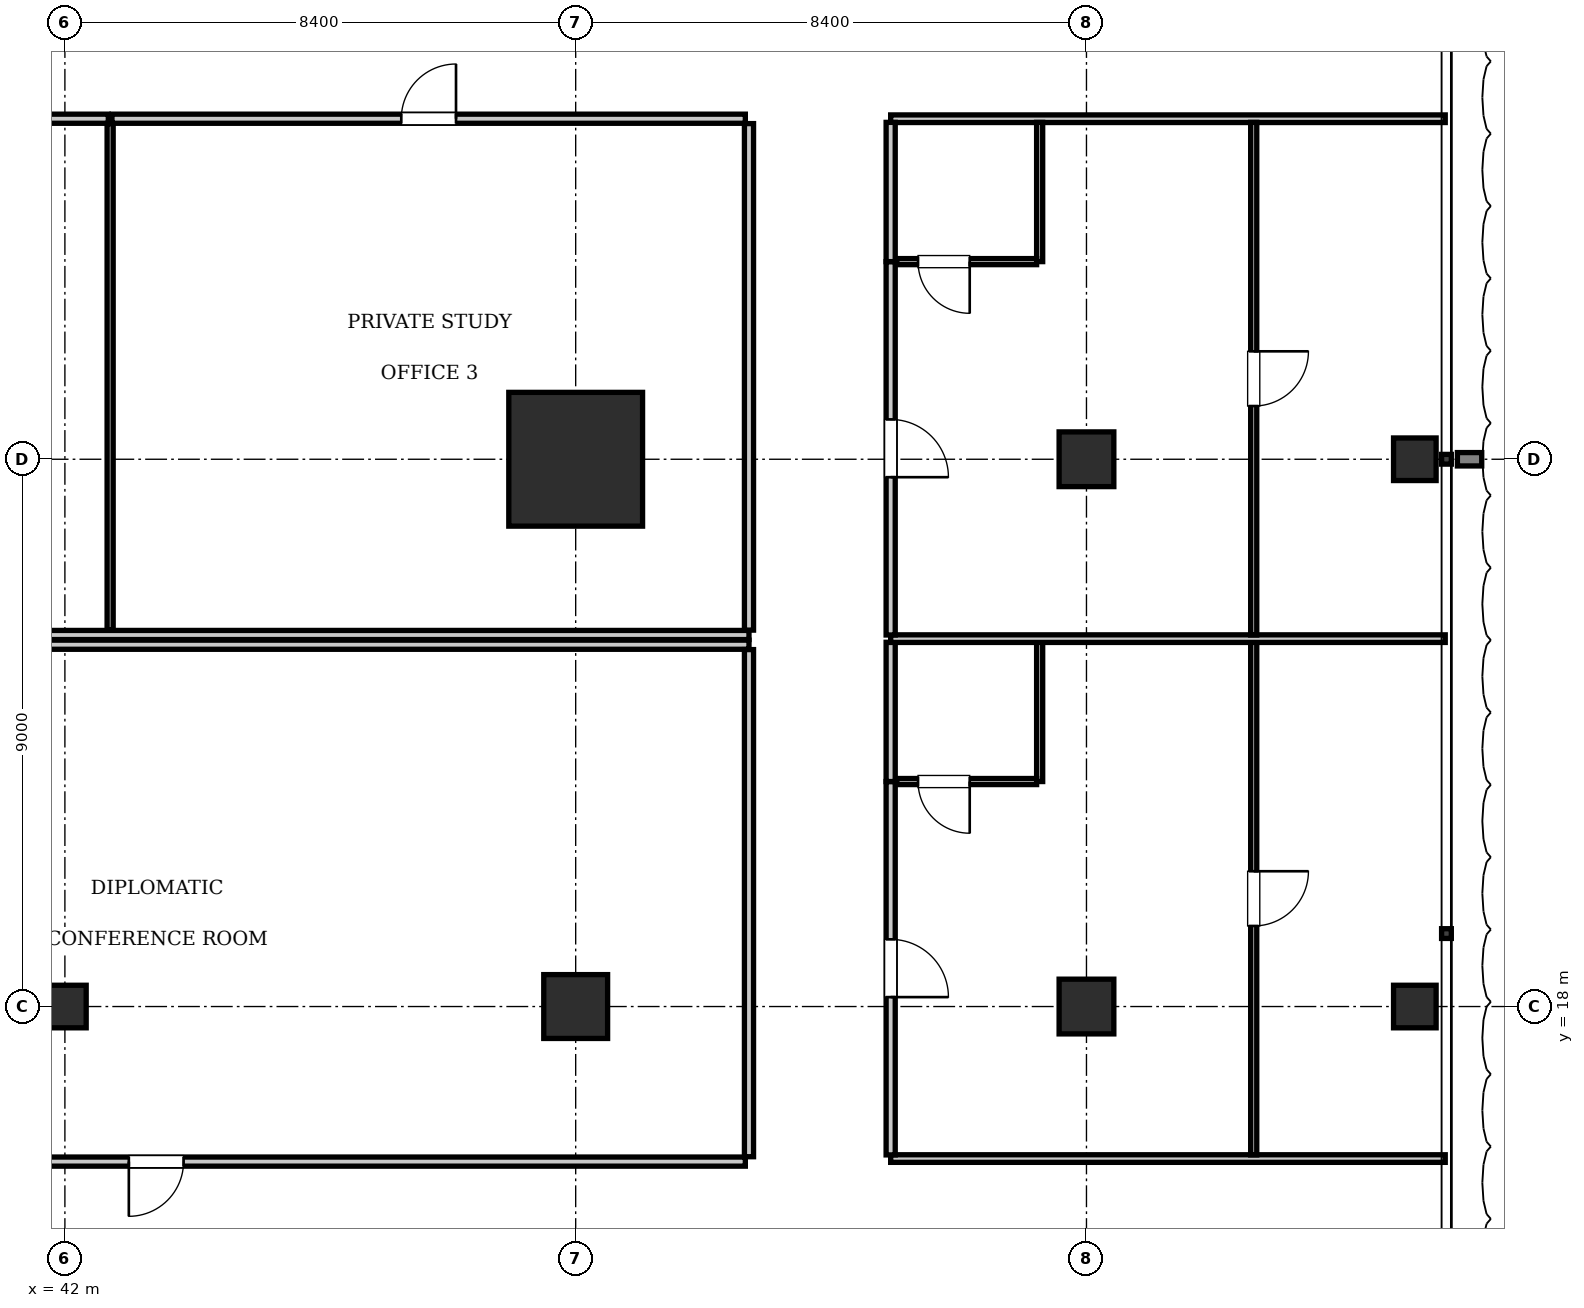
"""IFC4 building model, lengths in metres.
Left out: names, types, materials, properties, quantities, classifications, styles, units other than length and angle.
Written with IfcOpenShell. Run it as: python <this file> out.ifc"""

import sys

from ifc_helpers import new_model, si_unit, direction, frame, frame_2d, origin, origin_2d, place, context, subcontext, project, spatial, rectangle, i_section, extrude, element, fill, save


model = new_model("IFC4")
c1 = context("Model", 3, precision=1e-05, world=origin(), true_north=direction((0.0, 1.0)))
c2 = subcontext(c1, "Body", "Model", "MODEL_VIEW")
j1 = project(units=[si_unit("LENGTHUNIT", "METRE"), si_unit("PLANEANGLEUNIT", "RADIAN")], contexts=[c1])
p1 = place(None, origin())
s1 = spatial("IfcSite", under=j1, at=p1, CompositionType="ELEMENT")
p2 = place(p1, origin())
s2 = spatial("IfcBuilding", under=s1, at=p2, CompositionType="ELEMENT")
p3 = place(p2, frame((0.0, 0.0, 69.3)))
s3 = spatial("IfcBuildingStorey", under=s2, at=p3, CompositionType="ELEMENT", Elevation=69.3)
p4 = place(p3, frame((50.4, 27.0, 0.0), z_axis=(0.0, 0.0, 1.0), x_axis=(1.0, 0.0, 0.0)))
e1 = element("IfcColumn", 1, at=p4, inside=s3, PredefinedType="COLUMN", context=c2, shape_type="SweptSolid", body=[
    extrude(rectangle(XDim=2.2, YDim=2.2, at=origin_2d()), origin(), (0.0, 0.0, 1.0), 3.85),
])
p5 = place(p3, frame((50.4, 18.0, 0.0), z_axis=(0.0, 0.0, 1.0), x_axis=(1.0, 0.0, 0.0)))
e2 = element("IfcColumn", 2, at=p5, inside=s3, PredefinedType="COLUMN", context=c2, shape_type="SweptSolid", body=[
    extrude(rectangle(XDim=1.05, YDim=1.05, at=origin_2d()), origin(), (0.0, 0.0, 1.0), 3.85),
])
p6 = place(p3, frame((42.0, 18.0, 0.0), z_axis=(0.0, 0.0, 1.0), x_axis=(1.0, 0.0, 0.0)))
e3 = element("IfcColumn", 3, at=p6, inside=s3, PredefinedType="COLUMN", context=c2, shape_type="SweptSolid", body=[
    extrude(i_section(OverallWidth=0.7, OverallDepth=0.7, WebThickness=0.028, FlangeThickness=0.044, at=origin_2d()), origin(), (0.0, 0.0, 1.0), 3.85),
])
for number, where, z_axis, x_axis in (
    (4, (58.8, 18.0, 0.0), (0.0, 0.0, 1.0), (1.0, 0.0, 0.0)),
    (5, (58.8, 27.0, 0.0), (0.0, 0.0, 1.0), (1.0, 0.0, 0.0)),
):
    element("IfcColumn", number, at=place(p3, frame(where, z_axis=z_axis, x_axis=x_axis)), inside=s3, PredefinedType="COLUMN", context=c2, shape_type="SweptSolid", body=[
        extrude(rectangle(XDim=0.9, YDim=0.9, at=origin_2d()), origin(), (0.0, 0.0, 1.0), 3.85),
    ])
for number, where, z_axis, x_axis in (
    (6, (64.2, 18.0, 0.0), (0.0, 0.0, 1.0), (1.0, 0.0, 0.0)),
    (7, (64.2, 27.0, 0.0), (0.0, 0.0, 1.0), (1.0, 0.0, 0.0)),
):
    element("IfcColumn", number, at=place(p3, frame(where, z_axis=z_axis, x_axis=x_axis)), inside=s3, PredefinedType="COLUMN", context=c2, shape_type="SweptSolid", body=[
        extrude(i_section(OverallWidth=0.7, OverallDepth=0.7, WebThickness=0.028, FlangeThickness=0.044, at=origin_2d()), origin(), (0.0, 0.0, 1.0), 3.85),
    ])
p7 = place(p3, frame((22.35, 24.11, 0.0), z_axis=(0.0, 0.0, 1.0), x_axis=(1.0, 0.0, 0.0)))
e8 = element("IfcWall", 8, at=p7, inside=s3, PredefinedType="PARTITIONING", context=c2, shape_type="SweptSolid", body=[
    extrude(rectangle(XDim=30.9, YDim=0.15, at=frame_2d((15.45, 0.0))), origin(), (0.0, 0.0, 1.0), 3.61),
])
p8 = place(p3, frame((53.25, 24.19, 0.0), z_axis=(0.0, 0.0, 1.0), x_axis=(0.0, 1.0, 0.0)))
e9 = element("IfcWall", 9, at=p8, inside=s3, PredefinedType="PARTITIONING", context=c2, shape_type="SweptSolid", body=[
    extrude(rectangle(XDim=8.33, YDim=0.15, at=frame_2d((4.165, 0.0))), origin(), (0.0, 0.0, 1.0), 3.61),
])
p9 = place(p3, frame((34.122, 32.6, 0.0), z_axis=(0.0, 0.0, 1.0), x_axis=(1.0, 0.0, 0.0)))
e10 = element("IfcWall", 10, at=p9, inside=s3, PredefinedType="PARTITIONING", context=c2, shape_type="SweptSolid", body=[
    extrude(rectangle(XDim=8.592, YDim=0.15, at=frame_2d((4.296, 0.0))), origin(), (0.0, 0.0, 1.0), 3.61),
])
p10 = place(p9, frame((3.846, 0.0, 0.0)))
e11 = element("IfcOpeningElement", 11, at=p10, cuts=e10, PredefinedType="OPENING", context=c2, shape_type="SweptSolid", body=[
    extrude(rectangle(XDim=0.9, YDim=2.1, at=frame_2d((0.45, 1.05))), frame((0.0, 0.085, 0.0), z_axis=(0.0, -1.0, 0.0), x_axis=(1.0, 0.0, 0.0)), (0.0, 0.0, 1.0), 0.17),
])
p11 = place(p3, frame((42.744, 24.19, 0.0), z_axis=(0.0, 0.0, 1.0), x_axis=(0.0, 1.0, 0.0)))
e12 = element("IfcWall", 12, at=p11, inside=s3, PredefinedType="PARTITIONING", context=c2, shape_type="SweptSolid", body=[
    extrude(rectangle(XDim=8.33, YDim=0.1, at=frame_2d((4.165, 0.0))), origin(), (0.0, 0.0, 1.0), 3.61),
])
p12 = place(p3, frame((42.774, 32.6, 0.0), z_axis=(0.0, 0.0, 1.0), x_axis=(1.0, 0.0, 0.0)))
e13 = element("IfcWall", 13, at=p12, inside=s3, PredefinedType="PARTITIONING", context=c2, shape_type="SweptSolid", body=[
    extrude(rectangle(XDim=10.416, YDim=0.15, at=frame_2d((5.208, 0.0))), origin(), (0.0, 0.0, 1.0), 3.61),
])
p13 = place(p12, frame((4.758, 0.0, 0.0)))
e14 = element("IfcOpeningElement", 14, at=p13, cuts=e13, PredefinedType="OPENING", context=c2, shape_type="SweptSolid", body=[
    extrude(rectangle(XDim=0.9, YDim=2.1, at=frame_2d((0.45, 1.05))), frame((0.0, 0.085, 0.0), z_axis=(0.0, -1.0, 0.0), x_axis=(1.0, 0.0, 0.0)), (0.0, 0.0, 1.0), 0.17),
])
p14 = place(p3, frame((22.35, 23.95, 0.0), z_axis=(0.0, 0.0, 1.0), x_axis=(1.0, 0.0, 0.0)))
e15 = element("IfcWall", 15, at=p14, inside=s3, PredefinedType="PARTITIONING", context=c2, shape_type="SweptSolid", body=[
    extrude(rectangle(XDim=30.9, YDim=0.15, at=frame_2d((15.45, 0.0))), origin(), (0.0, 0.0, 1.0), 3.61),
])
p15 = place(p3, frame((53.25, 15.53, 0.0), z_axis=(0.0, 0.0, 1.0), x_axis=(0.0, 1.0, 0.0)))
e16 = element("IfcWall", 16, at=p15, inside=s3, PredefinedType="PARTITIONING", context=c2, shape_type="SweptSolid", body=[
    extrude(rectangle(XDim=8.34, YDim=0.15, at=frame_2d((4.17, 0.0))), origin(), (0.0, 0.0, 1.0), 3.61),
])
p16 = place(p3, frame((33.813, 15.45, 0.0), z_axis=(0.0, 0.0, 1.0), x_axis=(1.0, 0.0, 0.0)))
e17 = element("IfcWall", 17, at=p16, inside=s3, PredefinedType="PARTITIONING", context=c2, shape_type="SweptSolid", body=[
    extrude(rectangle(XDim=19.377, YDim=0.15, at=frame_2d((9.688, 0.0))), origin(), (0.0, 0.0, 1.0), 3.61),
])
p17 = place(p16, frame((9.239, 0.0, 0.0)))
e18 = element("IfcOpeningElement", 18, at=p17, cuts=e17, PredefinedType="OPENING", context=c2, shape_type="SweptSolid", body=[
    extrude(rectangle(XDim=0.9, YDim=2.1, at=frame_2d((0.45, 1.05))), frame((0.0, 0.085, 0.0), z_axis=(0.0, -1.0, 0.0), x_axis=(1.0, 0.0, 0.0)), (0.0, 0.0, 1.0), 0.17),
])
for number, where, z_axis, x_axis in (
    (19, (55.58, 15.5, 0.0), (0.0, 0.0, 1.0), (1.0, 0.0, 0.0)),
    (20, (55.58, 32.6, 0.0), (0.0, 0.0, 1.0), (1.0, 0.0, 0.0)),
):
    element("IfcWall", number, at=place(p3, frame(where, z_axis=z_axis, x_axis=x_axis)), inside=s3, PredefinedType="PARTITIONING", context=c2, shape_type="SweptSolid", body=[
        extrude(rectangle(XDim=9.12, YDim=0.125, at=frame_2d((4.56, 0.0))), origin(), (0.0, 0.0, 1.0), 3.61),
    ])
p18 = place(p3, frame((55.58, 15.56, 0.0), z_axis=(0.0, 0.0, 1.0), x_axis=(0.0, 1.0, 0.0)))
e21 = element("IfcWall", 21, at=p18, inside=s3, PredefinedType="PARTITIONING", context=c2, shape_type="SweptSolid", body=[
    extrude(rectangle(XDim=6.14, YDim=0.15, at=frame_2d((3.07, 0.0))), origin(), (0.0, 0.0, 1.0), 3.61),
])
p19 = place(p18, frame((2.595, 0.0, 0.0)))
e22 = element("IfcOpeningElement", 22, at=p19, cuts=e21, PredefinedType="OPENING", context=c2, shape_type="SweptSolid", body=[
    extrude(rectangle(XDim=0.95, YDim=2.15, at=frame_2d((0.475, 1.075))), frame((0.0, 0.085, 0.0), z_axis=(0.0, -1.0, 0.0), x_axis=(1.0, 0.0, 0.0)), (0.0, 0.0, 1.0), 0.17),
])
p20 = place(p3, frame((55.58, 21.7, 0.0), z_axis=(0.0, 0.0, 1.0), x_axis=(0.0, 1.0, 0.0)))
e23 = element("IfcWall", 23, at=p20, inside=s3, PredefinedType="PARTITIONING", context=c2, shape_type="SweptSolid", body=[
    extrude(rectangle(XDim=2.29, YDim=0.15, at=frame_2d((1.145, 0.0))), origin(), (0.0, 0.0, 1.0), 3.61),
])
p21 = place(p3, frame((58.03, 21.7, 0.0), z_axis=(0.0, 0.0, 1.0), x_axis=(0.0, 1.0, 0.0)))
e24 = element("IfcWall", 24, at=p21, inside=s3, PredefinedType="PARTITIONING", context=c2, shape_type="SweptSolid", body=[
    extrude(rectangle(XDim=2.29, YDim=0.1, at=frame_2d((1.145, 0.0))), origin(), (0.0, 0.0, 1.0), 3.61),
])
p22 = place(p3, frame((55.68, 21.7, 0.0), z_axis=(0.0, 0.0, 1.0), x_axis=(1.0, 0.0, 0.0)))
e25 = element("IfcWall", 25, at=p22, inside=s3, PredefinedType="PARTITIONING", context=c2, shape_type="SweptSolid", body=[
    extrude(rectangle(XDim=2.3, YDim=0.1, at=frame_2d((1.15, 0.0))), origin(), (0.0, 0.0, 1.0), 3.61),
])
p23 = place(p22, frame((0.35, 0.0, 0.0)))
e26 = element("IfcOpeningElement", 26, at=p23, cuts=e25, PredefinedType="OPENING", context=c2, shape_type="SweptSolid", body=[
    extrude(rectangle(XDim=0.85, YDim=2.1, at=frame_2d((0.425, 1.05))), frame((0.0, 0.06, 0.0), z_axis=(0.0, -1.0, 0.0), x_axis=(1.0, 0.0, 0.0)), (0.0, 0.0, 1.0), 0.12),
])
p24 = place(p3, frame((61.55, 15.56, 0.0), z_axis=(0.0, 0.0, 1.0), x_axis=(0.0, 1.0, 0.0)))
e27 = element("IfcWall", 27, at=p24, inside=s3, PredefinedType="PARTITIONING", context=c2, shape_type="SweptSolid", body=[
    extrude(rectangle(XDim=8.43, YDim=0.1, at=frame_2d((4.215, 0.0))), origin(), (0.0, 0.0, 1.0), 3.403),
])
p25 = place(p24, frame((3.765, 0.0, 0.0)))
e28 = element("IfcOpeningElement", 28, at=p25, cuts=e27, PredefinedType="OPENING", context=c2, shape_type="SweptSolid", body=[
    extrude(rectangle(XDim=0.9, YDim=2.1, at=frame_2d((0.45, 1.05))), frame((0.0, 0.06, 0.0), z_axis=(0.0, -1.0, 0.0), x_axis=(1.0, 0.0, 0.0)), (0.0, 0.0, 1.0), 0.12),
])
p26 = place(p3, frame((55.58, 24.05, 0.0), z_axis=(0.0, 0.0, 1.0), x_axis=(1.0, 0.0, 0.0)))
e29 = element("IfcWall", 29, at=p26, inside=s3, PredefinedType="PARTITIONING", context=c2, shape_type="SweptSolid", body=[
    extrude(rectangle(XDim=9.12, YDim=0.125, at=frame_2d((4.56, 0.0))), origin(), (0.0, 0.0, 1.0), 3.61),
])
p27 = place(p3, frame((55.58, 24.11, 0.0), z_axis=(0.0, 0.0, 1.0), x_axis=(0.0, 1.0, 0.0)))
e30 = element("IfcWall", 30, at=p27, inside=s3, PredefinedType="PARTITIONING", context=c2, shape_type="SweptSolid", body=[
    extrude(rectangle(XDim=6.14, YDim=0.15, at=frame_2d((3.07, 0.0))), origin(), (0.0, 0.0, 1.0), 3.61),
])
p28 = place(p27, frame((2.595, 0.0, 0.0)))
e31 = element("IfcOpeningElement", 31, at=p28, cuts=e30, PredefinedType="OPENING", context=c2, shape_type="SweptSolid", body=[
    extrude(rectangle(XDim=0.95, YDim=2.15, at=frame_2d((0.475, 1.075))), frame((0.0, 0.085, 0.0), z_axis=(0.0, -1.0, 0.0), x_axis=(1.0, 0.0, 0.0)), (0.0, 0.0, 1.0), 0.17),
])
p29 = place(p3, frame((55.58, 30.25, 0.0), z_axis=(0.0, 0.0, 1.0), x_axis=(0.0, 1.0, 0.0)))
e32 = element("IfcWall", 32, at=p29, inside=s3, PredefinedType="PARTITIONING", context=c2, shape_type="SweptSolid", body=[
    extrude(rectangle(XDim=2.29, YDim=0.15, at=frame_2d((1.145, 0.0))), origin(), (0.0, 0.0, 1.0), 3.61),
])
p30 = place(p3, frame((58.03, 30.25, 0.0), z_axis=(0.0, 0.0, 1.0), x_axis=(0.0, 1.0, 0.0)))
e33 = element("IfcWall", 33, at=p30, inside=s3, PredefinedType="PARTITIONING", context=c2, shape_type="SweptSolid", body=[
    extrude(rectangle(XDim=2.29, YDim=0.1, at=frame_2d((1.145, 0.0))), origin(), (0.0, 0.0, 1.0), 3.61),
])
p31 = place(p3, frame((55.68, 30.25, 0.0), z_axis=(0.0, 0.0, 1.0), x_axis=(1.0, 0.0, 0.0)))
e34 = element("IfcWall", 34, at=p31, inside=s3, PredefinedType="PARTITIONING", context=c2, shape_type="SweptSolid", body=[
    extrude(rectangle(XDim=2.3, YDim=0.1, at=frame_2d((1.15, 0.0))), origin(), (0.0, 0.0, 1.0), 3.61),
])
p32 = place(p31, frame((0.35, 0.0, 0.0)))
e35 = element("IfcOpeningElement", 35, at=p32, cuts=e34, PredefinedType="OPENING", context=c2, shape_type="SweptSolid", body=[
    extrude(rectangle(XDim=0.85, YDim=2.1, at=frame_2d((0.425, 1.05))), frame((0.0, 0.06, 0.0), z_axis=(0.0, -1.0, 0.0), x_axis=(1.0, 0.0, 0.0)), (0.0, 0.0, 1.0), 0.12),
])
p33 = place(p3, frame((61.55, 24.11, 0.0), z_axis=(0.0, 0.0, 1.0), x_axis=(0.0, 1.0, 0.0)))
e36 = element("IfcWall", 36, at=p33, inside=s3, PredefinedType="PARTITIONING", context=c2, shape_type="SweptSolid", body=[
    extrude(rectangle(XDim=8.43, YDim=0.1, at=frame_2d((4.215, 0.0))), origin(), (0.0, 0.0, 1.0), 3.207),
])
p34 = place(p33, frame((3.765, 0.0, 0.0)))
e37 = element("IfcOpeningElement", 37, at=p34, cuts=e36, PredefinedType="OPENING", context=c2, shape_type="SweptSolid", body=[
    extrude(rectangle(XDim=0.9, YDim=2.1, at=frame_2d((0.45, 1.05))), frame((0.0, 0.06, 0.0), z_axis=(0.0, -1.0, 0.0), x_axis=(1.0, 0.0, 0.0)), (0.0, 0.0, 1.0), 0.12),
])
p35 = place(p13, origin())
e38 = element("IfcDoor", 38, at=p35, inside=s3, OperationType="SINGLE_SWING_RIGHT", PredefinedType="DOOR", context=c2, shape_type="SweptSolid", body=[
    extrude(rectangle(XDim=0.9, YDim=2.1, at=frame_2d((0.45, 1.05))), frame((0.0, 0.025, 0.0), z_axis=(0.0, -1.0, 0.0), x_axis=(1.0, 0.0, 0.0)), (0.0, 0.0, 1.0), 0.05),
])
fill(e14, e38)
p36 = place(p17, frame((0.9, 0.0, 0.0), z_axis=(0.0, 0.0, 1.0), x_axis=(-1.0, 0.0, 0.0)))
e39 = element("IfcDoor", 39, at=p36, inside=s3, OperationType="SINGLE_SWING_RIGHT", PredefinedType="DOOR", context=c2, shape_type="SweptSolid", body=[
    extrude(rectangle(XDim=0.9, YDim=2.1, at=frame_2d((0.45, 1.05))), frame((0.0, 0.025, 0.0), z_axis=(0.0, -1.0, 0.0), x_axis=(1.0, 0.0, 0.0)), (0.0, 0.0, 1.0), 0.05),
])
fill(e18, e39)
p37 = place(p23, frame((0.85, 0.0, 0.0), z_axis=(0.0, 0.0, 1.0), x_axis=(-1.0, 0.0, 0.0)))
e40 = element("IfcDoor", 40, at=p37, inside=s3, OperationType="SINGLE_SWING_LEFT", PredefinedType="DOOR", context=c2, shape_type="SweptSolid", body=[
    extrude(rectangle(XDim=0.85, YDim=2.1, at=frame_2d((0.425, 1.05))), frame((0.0, 0.025, 0.0), z_axis=(0.0, -1.0, 0.0), x_axis=(1.0, 0.0, 0.0)), (0.0, 0.0, 1.0), 0.05),
])
fill(e26, e40)
p38 = place(p19, frame((0.95, 0.0, 0.0), z_axis=(0.0, 0.0, 1.0), x_axis=(-1.0, 0.0, 0.0)))
e41 = element("IfcDoor", 41, at=p38, inside=s3, OperationType="SINGLE_SWING_RIGHT", PredefinedType="DOOR", context=c2, shape_type="SweptSolid", body=[
    extrude(rectangle(XDim=0.95, YDim=2.15, at=frame_2d((0.475, 1.075))), frame((0.0, 0.025, 0.0), z_axis=(0.0, -1.0, 0.0), x_axis=(1.0, 0.0, 0.0)), (0.0, 0.0, 1.0), 0.05),
])
fill(e22, e41)
p39 = place(p25, frame((0.9, 0.0, 0.0), z_axis=(0.0, 0.0, 1.0), x_axis=(-1.0, 0.0, 0.0)))
e42 = element("IfcDoor", 42, at=p39, inside=s3, OperationType="SINGLE_SWING_LEFT", PredefinedType="DOOR", context=c2, shape_type="SweptSolid", body=[
    extrude(rectangle(XDim=0.9, YDim=2.1, at=frame_2d((0.45, 1.05))), frame((0.0, 0.025, 0.0), z_axis=(0.0, -1.0, 0.0), x_axis=(1.0, 0.0, 0.0)), (0.0, 0.0, 1.0), 0.05),
])
fill(e28, e42)
p40 = place(p32, frame((0.85, 0.0, 0.0), z_axis=(0.0, 0.0, 1.0), x_axis=(-1.0, 0.0, 0.0)))
e43 = element("IfcDoor", 43, at=p40, inside=s3, OperationType="SINGLE_SWING_LEFT", PredefinedType="DOOR", context=c2, shape_type="SweptSolid", body=[
    extrude(rectangle(XDim=0.85, YDim=2.1, at=frame_2d((0.425, 1.05))), frame((0.0, 0.025, 0.0), z_axis=(0.0, -1.0, 0.0), x_axis=(1.0, 0.0, 0.0)), (0.0, 0.0, 1.0), 0.05),
])
fill(e35, e43)
p41 = place(p28, frame((0.95, 0.0, 0.0), z_axis=(0.0, 0.0, 1.0), x_axis=(-1.0, 0.0, 0.0)))
e44 = element("IfcDoor", 44, at=p41, inside=s3, OperationType="SINGLE_SWING_RIGHT", PredefinedType="DOOR", context=c2, shape_type="SweptSolid", body=[
    extrude(rectangle(XDim=0.95, YDim=2.15, at=frame_2d((0.475, 1.075))), frame((0.0, 0.025, 0.0), z_axis=(0.0, -1.0, 0.0), x_axis=(1.0, 0.0, 0.0)), (0.0, 0.0, 1.0), 0.05),
])
fill(e31, e44)
p42 = place(p34, frame((0.9, 0.0, 0.0), z_axis=(0.0, 0.0, 1.0), x_axis=(-1.0, 0.0, 0.0)))
e45 = element("IfcDoor", 45, at=p42, inside=s3, OperationType="SINGLE_SWING_LEFT", PredefinedType="DOOR", context=c2, shape_type="SweptSolid", body=[
    extrude(rectangle(XDim=0.9, YDim=2.1, at=frame_2d((0.45, 1.05))), frame((0.0, 0.025, 0.0), z_axis=(0.0, -1.0, 0.0), x_axis=(1.0, 0.0, 0.0)), (0.0, 0.0, 1.0), 0.05),
])
fill(e37, e45)
save(model, sys.argv[1])
